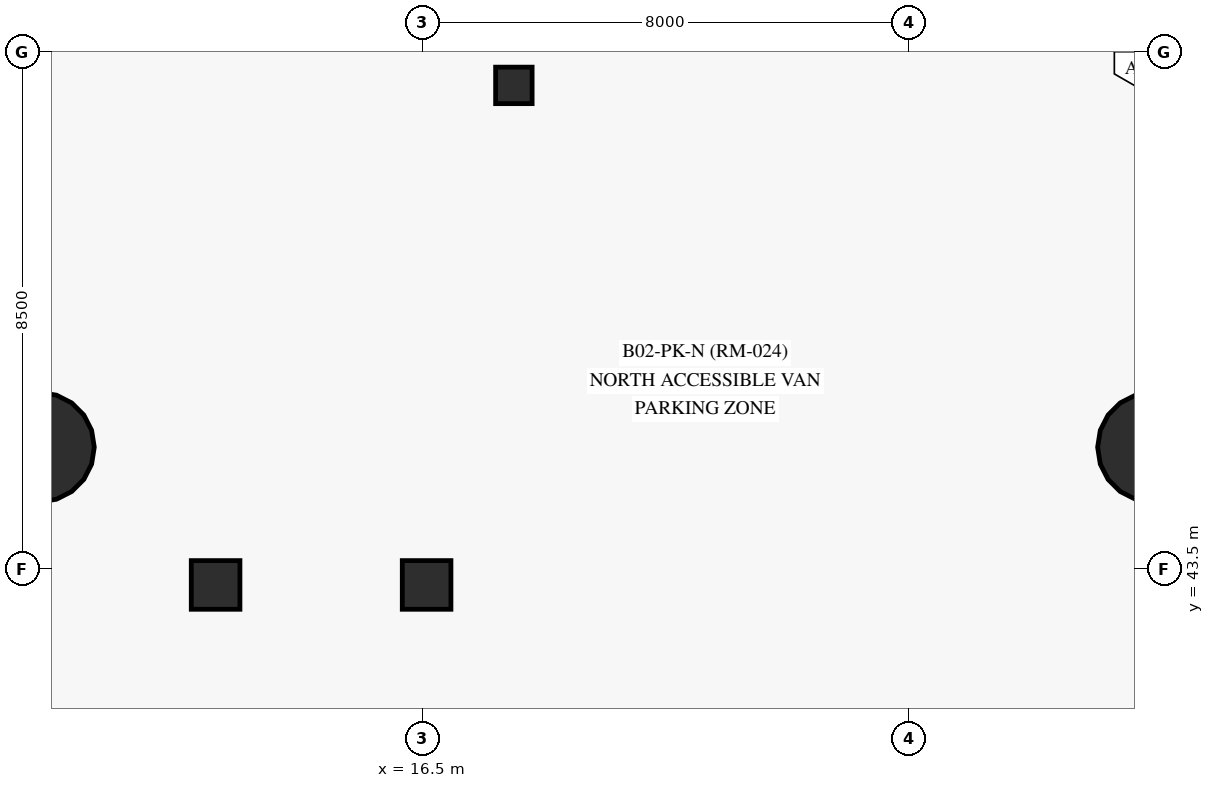
"""IFC4 building model, lengths in metres.
Left out: names, types, materials, properties, quantities, classifications, styles, units other than length and angle.
Written with IfcOpenShell. Run it as: python <this file> out.ifc"""

import sys

from ifc_helpers import new_model, si_unit, direction, frame, origin, origin_with_axes, origin_2d, place, context, subcontext, project, spatial, rectangle, circle, extrude, source, transform, mapped, element, save


model = new_model("IFC4")
c1 = context("Model", 3, precision=1e-05, world=origin(), true_north=direction((0.0, 1.0)))
c2 = subcontext(c1, "Body", "Model", "MODEL_VIEW")
j1 = project(units=[si_unit("LENGTHUNIT", "METRE"), si_unit("PLANEANGLEUNIT", "RADIAN")], contexts=[c1])
p1 = place(None, origin())
s1 = spatial("IfcSite", under=j1, at=p1, CompositionType="ELEMENT")
p2 = place(p1, origin())
s2 = spatial("IfcBuilding", under=s1, at=p2, CompositionType="ELEMENT")
p3 = place(p2, frame((0.0, 0.0, -8.4)))
s3 = spatial("IfcBuildingStorey", under=s2, at=p3, CompositionType="ELEMENT", Elevation=-8.4)
m1 = source(origin_with_axes(), c2, "Body", "SweptSolid", [
    extrude(rectangle(XDim=0.8, YDim=0.8, at=origin_2d()), origin(), (0.0, 0.0, 1.0), 4.2),
])
for number, where, z_axis, x_axis in (
    (1, (13.095, 43.235, 0.0), (0.0, 0.0, 1.0), (1.0, 0.0, 0.0)),
    (2, (16.565, 43.235, 0.0), (0.0, 0.0, 1.0), (1.0, 0.0, 0.0)),
):
    element("IfcColumn", number, at=place(p3, frame(where, z_axis=z_axis, x_axis=x_axis)), inside=s3, PredefinedType="COLUMN", context=c2, shape_type="MappedRepresentation", body=[
        mapped(m1, transform((0.0, 0.0, 0.0), scale=1.0)),
    ])
m2 = source(origin_with_axes(), c2, "Body", "SweptSolid", [
    extrude(rectangle(XDim=0.6, YDim=0.6, at=origin_2d()), origin(), (0.0, 0.0, 1.0), 4.2),
])
p4 = place(p3, frame((18.0, 51.45, 0.0), z_axis=(0.0, 0.0, 1.0), x_axis=(1.0, 0.0, 0.0)))
e3 = element("IfcColumn", 3, at=p4, inside=s3, PredefinedType="COLUMN", context=c2, shape_type="MappedRepresentation", body=[
    mapped(m2, transform((0.0, 0.0, 0.0), scale=1.0)),
])
m3 = source(origin_with_axes(), c2, "Body", "SweptSolid", [
    extrude(circle(Radius=0.9, at=origin_2d()), origin(), (0.0, 0.0, 1.0), 4.2),
])
for number, where, z_axis, x_axis in (
    (4, (10.2, 45.5, 0.0), (0.0, 0.0, 1.0), (1.0, 0.0, 0.0)),
    (5, (28.5, 45.5, 0.0), (0.0, 0.0, 1.0), (1.0, 0.0, 0.0)),
):
    element("IfcColumn", number, at=place(p3, frame(where, z_axis=z_axis, x_axis=x_axis)), inside=s3, PredefinedType="COLUMN", context=c2, shape_type="MappedRepresentation", body=[
        mapped(m3, transform((0.0, 0.0, 0.0), scale=1.0)),
    ])
save(model, sys.argv[1])
